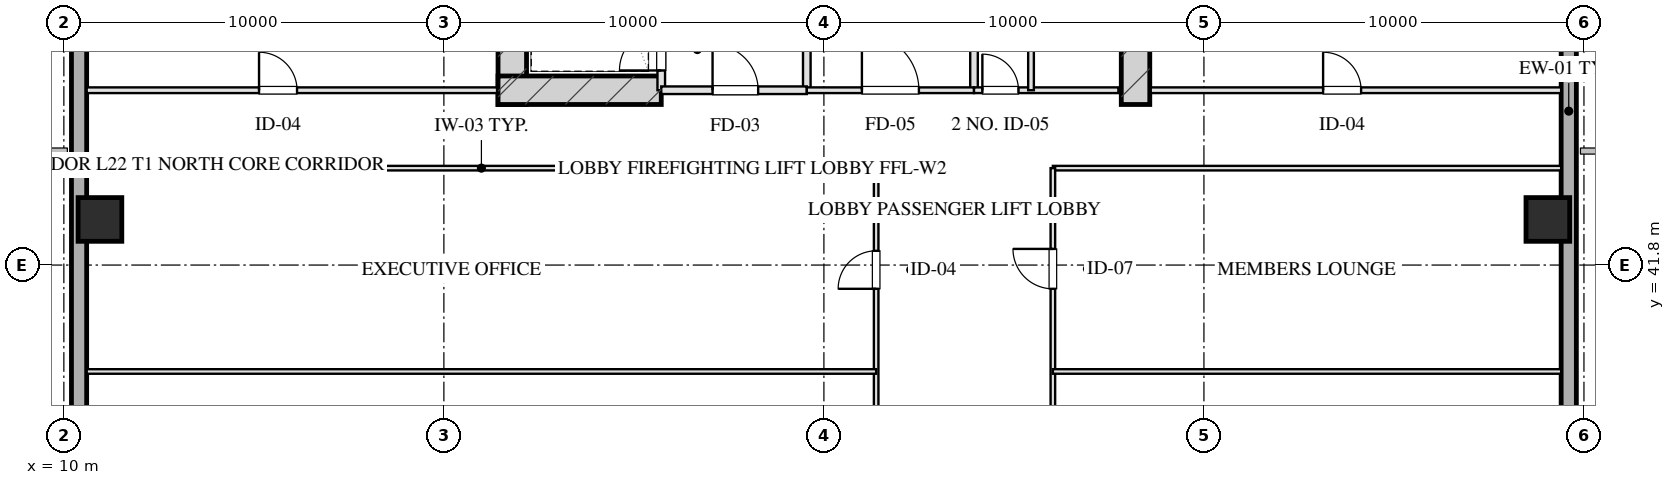
"""IFC4 building model, lengths in metres.
Left out: names, types, materials, properties, quantities, classifications, styles, units other than length and angle.
Written with IfcOpenShell. Run it as: python <this file> out.ifc"""

import sys

from ifc_helpers import new_model, si_unit, direction, frame, frame_2d, origin, origin_2d, place, context, subcontext, project, spatial, rectangle, hollow_rectangle, extrude, element, fill, save


model = new_model("IFC4")
c1 = context("Model", 3, precision=1e-05, world=origin(), true_north=direction((0.0, 1.0)))
c2 = subcontext(c1, "Body", "Model", "MODEL_VIEW")
j1 = project(units=[si_unit("LENGTHUNIT", "METRE"), si_unit("PLANEANGLEUNIT", "RADIAN")], contexts=[c1])
p1 = place(None, origin())
s1 = spatial("IfcSite", under=j1, at=p1, CompositionType="ELEMENT")
p2 = place(p1, origin())
s2 = spatial("IfcBuilding", under=s1, at=p2, CompositionType="ELEMENT")
p3 = place(p2, frame((0.0, 0.0, 88.55)))
s3 = spatial("IfcBuildingStorey", under=s2, at=p3, CompositionType="ELEMENT", Elevation=88.55)
for number, where, z_axis, x_axis in (
    (1, (21.8, 46.025, 0.0), (0.0, 0.0, 1.0), (0.0, 1.0, 0.0)),
    (2, (38.2, 46.025, 0.0), (0.0, 0.0, 1.0), (0.0, 1.0, 0.0)),
):
    element("IfcWall", number, at=place(p3, frame(where, z_axis=z_axis, x_axis=x_axis)), inside=s3, PredefinedType="SHEAR", context=c2, shape_type="SweptSolid", body=[
        extrude(rectangle(XDim=9.63, YDim=0.75, at=frame_2d((4.815, 0.0))), origin(), (0.0, 0.0, 1.0), 3.45),
    ])
p4 = place(p3, frame((21.425, 46.4, 0.0), z_axis=(0.0, 0.0, 1.0), x_axis=(1.0, 0.0, 0.0)))
e3 = element("IfcWall", 3, at=p4, inside=s3, PredefinedType="SHEAR", context=c2, shape_type="SweptSolid", body=[
    extrude(rectangle(XDim=4.295, YDim=0.75, at=frame_2d((2.147, 0.0))), origin(), (0.0, 0.0, 1.0), 3.45),
])
for number, where, z_axis, x_axis in (
    (4, (10.95, 43.0, 0.0), (0.0, 0.0, 1.0), (1.0, 0.0, 0.0)),
    (5, (49.05, 43.0, 0.0), (0.0, 0.0, 1.0), (1.0, 0.0, 0.0)),
):
    element("IfcColumn", number, at=place(p3, frame(where, z_axis=z_axis, x_axis=x_axis)), inside=s3, PredefinedType="COLUMN", context=c2, shape_type="SweptSolid", body=[
        extrude(hollow_rectangle(XDim=1.15, YDim=1.15, WallThickness=0.04, at=origin_2d()), origin(), (0.0, 0.0, 1.0), 3.451),
    ])
p5 = place(p3, frame((10.4, 7.2, 0.0), z_axis=(0.0, 0.0, 1.0), x_axis=(0.0, 1.0, 0.0)))
e6 = element("IfcWall", 6, at=p5, inside=s3, PredefinedType="SOLIDWALL", context=c2, shape_type="SweptSolid", body=[
    extrude(rectangle(XDim=53.6, YDim=0.4, at=frame_2d((26.8, 0.0))), origin(), (0.0, 0.0, 1.0), 2.55),
])
p6 = place(p5, frame((21.85, 0.0, 0.0)))
e7 = element("IfcOpeningElement", 7, at=p6, cuts=e6, PredefinedType="OPENING", context=c2, shape_type="SweptSolid", body=[
    extrude(rectangle(XDim=1.1, YDim=2.15, at=frame_2d((0.55, 1.075))), frame((0.0, 0.21, 0.0), z_axis=(0.0, -1.0, 0.0), x_axis=(1.0, 0.0, 0.0)), (0.0, 0.0, 1.0), 0.42),
])
p7 = place(p3, frame((49.6, 60.8, 0.0), z_axis=(0.0, 0.0, 1.0), x_axis=(0.0, -1.0, 0.0)))
e8 = element("IfcWall", 8, at=p7, inside=s3, PredefinedType="SOLIDWALL", context=c2, shape_type="SweptSolid", body=[
    extrude(rectangle(XDim=53.6, YDim=0.4, at=frame_2d((26.8, 0.0))), origin(), (0.0, 0.0, 1.0), 2.55),
])
p8 = place(p7, frame((23.0, 0.0, 0.75)))
e9 = element("IfcOpeningElement", 9, at=p8, cuts=e8, PredefinedType="OPENING", context=c2, shape_type="SweptSolid", body=[
    extrude(rectangle(XDim=2.4, YDim=1.4, at=frame_2d((1.2, 0.7))), frame((0.0, 0.21, 0.0), z_axis=(0.0, -1.0, 0.0), x_axis=(1.0, 0.0, 0.0)), (0.0, 0.0, 1.0), 0.42),
])
p9 = place(p7, frame((30.65, 0.0, 0.0)))
e10 = element("IfcOpeningElement", 10, at=p9, cuts=e8, PredefinedType="OPENING", context=c2, shape_type="SweptSolid", body=[
    extrude(rectangle(XDim=1.1, YDim=2.15, at=frame_2d((0.55, 1.075))), frame((0.0, 0.21, 0.0), z_axis=(0.0, -1.0, 0.0), x_axis=(1.0, 0.0, 0.0)), (0.0, 0.0, 1.0), 0.42),
])
p10 = place(p3, frame((25.72, 46.4, 0.0), z_axis=(0.0, 0.0, 1.0), x_axis=(0.0, 1.0, 0.0)))
e11 = element("IfcWall", 11, at=p10, inside=s3, PredefinedType="PARTITIONING", context=c2, shape_type="SweptSolid", body=[
    extrude(rectangle(XDim=1.9, YDim=0.2, at=frame_2d((0.95, 0.0))), origin(), (0.0, 0.0, 1.0), 3.155),
])
p11 = place(p10, frame((0.52, 0.0, 0.0)))
e12 = element("IfcOpeningElement", 12, at=p11, cuts=e11, PredefinedType="OPENING", context=c2, shape_type="SweptSolid", body=[
    extrude(rectangle(XDim=1.1, YDim=2.05, at=frame_2d((0.55, 1.025))), frame((0.0, 0.11, 0.0), z_axis=(0.0, -1.0, 0.0), x_axis=(1.0, 0.0, 0.0)), (0.0, 0.0, 1.0), 0.22),
])
p12 = place(p3, frame((29.55, 46.4, 0.0), z_axis=(0.0, 0.0, 1.0), x_axis=(0.0, 1.0, 0.0)))
e13 = element("IfcWall", 13, at=p12, inside=s3, PredefinedType="PARTITIONING", context=c2, shape_type="SweptSolid", body=[
    extrude(rectangle(XDim=8.43, YDim=0.2, at=frame_2d((4.215, 0.0))), origin(), (0.0, 0.0, 1.0), 3.155),
])
p13 = place(p3, frame((25.72, 46.4, 0.0), z_axis=(0.0, 0.0, 1.0), x_axis=(1.0, 0.0, 0.0)))
e14 = element("IfcWall", 14, at=p13, inside=s3, PredefinedType="PARTITIONING", context=c2, shape_type="SweptSolid", body=[
    extrude(rectangle(XDim=3.83, YDim=0.2, at=frame_2d((1.915, 0.0))), origin(), (0.0, 0.0, 1.0), 3.155),
])
p14 = place(p13, frame((1.35, 0.0, 0.0)))
e15 = element("IfcOpeningElement", 15, at=p14, cuts=e14, PredefinedType="OPENING", context=c2, shape_type="SweptSolid", body=[
    extrude(rectangle(XDim=1.2, YDim=2.05, at=frame_2d((0.6, 1.025))), frame((0.0, 0.11, 0.0), z_axis=(0.0, -1.0, 0.0), x_axis=(1.0, 0.0, 0.0)), (0.0, 0.0, 1.0), 0.22),
])
p15 = place(p3, frame((33.95, 46.4, 0.0), z_axis=(0.0, 0.0, 1.0), x_axis=(0.0, 1.0, 0.0)))
e16 = element("IfcWall", 16, at=p15, inside=s3, PredefinedType="PARTITIONING", context=c2, shape_type="SweptSolid", body=[
    extrude(rectangle(XDim=8.43, YDim=0.2, at=frame_2d((4.215, 0.0))), origin(), (0.0, 0.0, 1.0), 3.155),
])
p16 = place(p3, frame((29.55, 46.4, 0.0), z_axis=(0.0, 0.0, 1.0), x_axis=(1.0, 0.0, 0.0)))
e17 = element("IfcWall", 17, at=p16, inside=s3, PredefinedType="PARTITIONING", context=c2, shape_type="SweptSolid", body=[
    extrude(rectangle(XDim=4.4, YDim=0.15, at=frame_2d((2.2, 0.0))), origin(), (0.0, 0.0, 1.0), 3.155),
])
p17 = place(p16, frame((1.45, 0.0, 0.0)))
e18 = element("IfcOpeningElement", 18, at=p17, cuts=e17, PredefinedType="OPENING", context=c2, shape_type="SweptSolid", body=[
    extrude(rectangle(XDim=1.5, YDim=2.05, at=frame_2d((0.75, 1.025))), frame((0.0, 0.085, 0.0), z_axis=(0.0, -1.0, 0.0), x_axis=(1.0, 0.0, 0.0)), (0.0, 0.0, 1.0), 0.17),
])
p18 = place(p3, frame((33.95, 46.4, 0.0), z_axis=(0.0, 0.0, 1.0), x_axis=(1.0, 0.0, 0.0)))
e19 = element("IfcWall", 19, at=p18, inside=s3, PredefinedType="PARTITIONING", context=c2, shape_type="SweptSolid", body=[
    extrude(rectangle(XDim=3.8, YDim=0.15, at=frame_2d((1.9, 0.0))), origin(), (0.0, 0.0, 1.0), 3.155),
])
p19 = place(p18, frame((0.22, 0.0, 0.0)))
e20 = element("IfcOpeningElement", 20, at=p19, cuts=e19, PredefinedType="OPENING", context=c2, shape_type="SweptSolid", body=[
    extrude(rectangle(XDim=0.95, YDim=2.05, at=frame_2d((0.475, 1.025))), frame((0.0, 0.085, 0.0), z_axis=(0.0, -1.0, 0.0), x_axis=(1.0, 0.0, 0.0)), (0.0, 0.0, 1.0), 0.17),
])
p20 = place(p3, frame((35.45, 46.4, 0.0), z_axis=(0.0, 0.0, 1.0), x_axis=(0.0, 1.0, 0.0)))
e21 = element("IfcWall", 21, at=p20, inside=s3, PredefinedType="PARTITIONING", context=c2, shape_type="SweptSolid", body=[
    extrude(rectangle(XDim=8.43, YDim=0.15, at=frame_2d((4.215, 0.0))), origin(), (0.0, 0.0, 1.0), 2.745),
])
p21 = place(p20, frame((2.55, 0.0, 0.0)))
e22 = element("IfcOpeningElement", 22, at=p21, cuts=e21, PredefinedType="OPENING", context=c2, shape_type="SweptSolid", body=[
    extrude(rectangle(XDim=0.95, YDim=2.05, at=frame_2d((0.475, 1.025))), frame((0.0, 0.085, 0.0), z_axis=(0.0, -1.0, 0.0), x_axis=(1.0, 0.0, 0.0)), (0.0, 0.0, 1.0), 0.17),
])
p22 = place(p20, frame((4.7, 0.0, 0.0)))
e23 = element("IfcOpeningElement", 23, at=p22, cuts=e21, PredefinedType="OPENING", context=c2, shape_type="SweptSolid", body=[
    extrude(rectangle(XDim=0.9, YDim=2.05, at=frame_2d((0.45, 1.025))), frame((0.0, 0.085, 0.0), z_axis=(0.0, -1.0, 0.0), x_axis=(1.0, 0.0, 0.0)), (0.0, 0.0, 1.0), 0.17),
])
p23 = place(p20, frame((6.8, 0.0, 0.0)))
e24 = element("IfcOpeningElement", 24, at=p23, cuts=e21, PredefinedType="OPENING", context=c2, shape_type="SweptSolid", body=[
    extrude(rectangle(XDim=0.9, YDim=2.05, at=frame_2d((0.45, 1.025))), frame((0.0, 0.085, 0.0), z_axis=(0.0, -1.0, 0.0), x_axis=(1.0, 0.0, 0.0)), (0.0, 0.0, 1.0), 0.17),
])
p24 = place(p3, frame((10.6, 46.4, 0.0), z_axis=(0.0, 0.0, 1.0), x_axis=(1.0, 0.0, 0.0)))
e25 = element("IfcWall", 25, at=p24, inside=s3, PredefinedType="PARTITIONING", context=c2, shape_type="SweptSolid", body=[
    extrude(rectangle(XDim=10.8, YDim=0.15, at=frame_2d((5.4, 0.0))), origin(), (0.0, 0.0, 1.0), 2.15),
])
p25 = place(p24, frame((4.536, 0.0, 0.0)))
e26 = element("IfcOpeningElement", 26, at=p25, cuts=e25, PredefinedType="OPENING", context=c2, shape_type="SweptSolid", body=[
    extrude(rectangle(XDim=1.0, YDim=2.05, at=frame_2d((0.5, 1.025))), frame((0.0, 0.085, 0.0), z_axis=(0.0, -1.0, 0.0), x_axis=(1.0, 0.0, 0.0)), (0.0, 0.0, 1.0), 0.17),
])
p26 = place(p3, frame((38.6, 46.4, 0.0), z_axis=(0.0, 0.0, 1.0), x_axis=(1.0, 0.0, 0.0)))
e27 = element("IfcWall", 27, at=p26, inside=s3, PredefinedType="PARTITIONING", context=c2, shape_type="SweptSolid", body=[
    extrude(rectangle(XDim=10.8, YDim=0.15, at=frame_2d((5.4, 0.0))), origin(), (0.0, 0.0, 1.0), 2.15),
])
p27 = place(p26, frame((4.536, 0.0, 0.0)))
e28 = element("IfcOpeningElement", 28, at=p27, cuts=e27, PredefinedType="OPENING", context=c2, shape_type="SweptSolid", body=[
    extrude(rectangle(XDim=1.0, YDim=2.05, at=frame_2d((0.5, 1.025))), frame((0.0, 0.085, 0.0), z_axis=(0.0, -1.0, 0.0), x_axis=(1.0, 0.0, 0.0)), (0.0, 0.0, 1.0), 0.17),
])
p28 = place(p3, frame((10.6, 44.35, 0.0), z_axis=(0.0, 0.0, 1.0), x_axis=(1.0, 0.0, 0.0)))
e29 = element("IfcWall", 29, at=p28, inside=s3, PredefinedType="PARTITIONING", context=c2, shape_type="SweptSolid", body=[
    extrude(rectangle(XDim=20.775, YDim=0.12, at=frame_2d((10.387, 0.0))), origin(), (0.0, 0.0, 1.0), 2.15),
])
p29 = place(p3, frame((36.025, 44.35, 0.0), z_axis=(0.0, 0.0, 1.0), x_axis=(1.0, 0.0, 0.0)))
e30 = element("IfcWall", 30, at=p29, inside=s3, PredefinedType="PARTITIONING", context=c2, shape_type="SweptSolid", body=[
    extrude(rectangle(XDim=13.375, YDim=0.12, at=frame_2d((6.688, 0.0))), origin(), (0.0, 0.0, 1.0), 2.15),
])
p30 = place(p3, frame((31.375, 23.65, 0.0), z_axis=(0.0, 0.0, 1.0), x_axis=(0.0, 1.0, 0.0)))
e31 = element("IfcWall", 31, at=p30, inside=s3, PredefinedType="PARTITIONING", context=c2, shape_type="SweptSolid", body=[
    extrude(rectangle(XDim=20.7, YDim=0.12, at=frame_2d((10.35, 0.0))), origin(), (0.0, 0.0, 1.0), 3.155),
])
p31 = place(p30, frame((0.775, 0.0, 0.0)))
e32 = element("IfcOpeningElement", 32, at=p31, cuts=e31, PredefinedType="OPENING", context=c2, shape_type="SweptSolid", body=[
    extrude(rectangle(XDim=1.05, YDim=2.05, at=frame_2d((0.525, 1.025))), frame((0.0, 0.07, 0.0), z_axis=(0.0, -1.0, 0.0), x_axis=(1.0, 0.0, 0.0)), (0.0, 0.0, 1.0), 0.14),
])
p32 = place(p30, frame((5.35, 0.0, 0.0)))
e33 = element("IfcOpeningElement", 33, at=p32, cuts=e31, PredefinedType="OPENING", context=c2, shape_type="SweptSolid", body=[
    extrude(rectangle(XDim=1.0, YDim=2.05, at=frame_2d((0.5, 1.025))), frame((0.0, 0.07, 0.0), z_axis=(0.0, -1.0, 0.0), x_axis=(1.0, 0.0, 0.0)), (0.0, 0.0, 1.0), 0.14),
])
p33 = place(p30, frame((9.85, 0.0, 0.0)))
e34 = element("IfcOpeningElement", 34, at=p33, cuts=e31, PredefinedType="OPENING", context=c2, shape_type="SweptSolid", body=[
    extrude(rectangle(XDim=0.85, YDim=2.05, at=frame_2d((0.425, 1.025))), frame((0.0, 0.07, 0.0), z_axis=(0.0, -1.0, 0.0), x_axis=(1.0, 0.0, 0.0)), (0.0, 0.0, 1.0), 0.14),
])
p34 = place(p30, frame((12.95, 0.0, 0.0)))
e35 = element("IfcOpeningElement", 35, at=p34, cuts=e31, PredefinedType="OPENING", context=c2, shape_type="SweptSolid", body=[
    extrude(rectangle(XDim=1.0, YDim=2.05, at=frame_2d((0.5, 1.025))), frame((0.0, 0.07, 0.0), z_axis=(0.0, -1.0, 0.0), x_axis=(1.0, 0.0, 0.0)), (0.0, 0.0, 1.0), 0.14),
])
p35 = place(p30, frame((17.525, 0.0, 0.0)))
e36 = element("IfcOpeningElement", 36, at=p35, cuts=e31, PredefinedType="OPENING", context=c2, shape_type="SweptSolid", body=[
    extrude(rectangle(XDim=1.0, YDim=2.05, at=frame_2d((0.5, 1.025))), frame((0.0, 0.07, 0.0), z_axis=(0.0, -1.0, 0.0), x_axis=(1.0, 0.0, 0.0)), (0.0, 0.0, 1.0), 0.14),
])
p36 = place(p3, frame((36.025, 23.65, 0.0), z_axis=(0.0, 0.0, 1.0), x_axis=(0.0, 1.0, 0.0)))
e37 = element("IfcWall", 37, at=p36, inside=s3, PredefinedType="PARTITIONING", context=c2, shape_type="SweptSolid", body=[
    extrude(rectangle(XDim=20.7, YDim=0.12, at=frame_2d((10.35, 0.0))), origin(), (0.0, 0.0, 1.0), 3.155),
])
p37 = place(p36, frame((4.075, 0.0, 0.0)))
e38 = element("IfcOpeningElement", 38, at=p37, cuts=e37, PredefinedType="OPENING", context=c2, shape_type="SweptSolid", body=[
    extrude(rectangle(XDim=1.0, YDim=2.05, at=frame_2d((0.5, 1.025))), frame((0.0, 0.07, 0.0), z_axis=(0.0, -1.0, 0.0), x_axis=(1.0, 0.0, 0.0)), (0.0, 0.0, 1.0), 0.14),
])
p38 = place(p36, frame((11.75, 0.0, 0.0)))
e39 = element("IfcOpeningElement", 39, at=p38, cuts=e37, PredefinedType="OPENING", context=c2, shape_type="SweptSolid", body=[
    extrude(rectangle(XDim=1.0, YDim=2.05, at=frame_2d((0.5, 1.025))), frame((0.0, 0.07, 0.0), z_axis=(0.0, -1.0, 0.0), x_axis=(1.0, 0.0, 0.0)), (0.0, 0.0, 1.0), 0.14),
])
p39 = place(p36, frame((17.525, 0.0, 0.0)))
e40 = element("IfcOpeningElement", 40, at=p39, cuts=e37, PredefinedType="OPENING", context=c2, shape_type="SweptSolid", body=[
    extrude(rectangle(XDim=1.05, YDim=2.05, at=frame_2d((0.525, 1.025))), frame((0.0, 0.07, 0.0), z_axis=(0.0, -1.0, 0.0), x_axis=(1.0, 0.0, 0.0)), (0.0, 0.0, 1.0), 0.14),
])
p40 = place(p3, frame((10.6, 39.0, 0.0), z_axis=(0.0, 0.0, 1.0), x_axis=(1.0, 0.0, 0.0)))
e41 = element("IfcWall", 41, at=p40, inside=s3, PredefinedType="PARTITIONING", context=c2, shape_type="SweptSolid", body=[
    extrude(rectangle(XDim=20.775, YDim=0.12, at=frame_2d((10.387, 0.0))), origin(), (0.0, 0.0, 1.0), 3.155),
])
p41 = place(p3, frame((36.025, 39.0, 0.0), z_axis=(0.0, 0.0, 1.0), x_axis=(1.0, 0.0, 0.0)))
e42 = element("IfcWall", 42, at=p41, inside=s3, PredefinedType="PARTITIONING", context=c2, shape_type="SweptSolid", body=[
    extrude(rectangle(XDim=13.375, YDim=0.12, at=frame_2d((6.688, 0.0))), origin(), (0.0, 0.0, 1.0), 3.155),
])
p42 = place(p11, origin())
e43 = element("IfcDoor", 43, at=p42, inside=s3, OperationType="SINGLE_SWING_LEFT", PredefinedType="DOOR", context=c2, shape_type="SweptSolid", body=[
    extrude(rectangle(XDim=1.1, YDim=2.05, at=frame_2d((0.55, 1.025))), frame((0.0, 0.025, 0.0), z_axis=(0.0, -1.0, 0.0), x_axis=(1.0, 0.0, 0.0)), (0.0, 0.0, 1.0), 0.05),
])
fill(e12, e43)
p43 = place(p14, origin())
e44 = element("IfcDoor", 44, at=p43, inside=s3, OperationType="SINGLE_SWING_LEFT", PredefinedType="DOOR", context=c2, shape_type="SweptSolid", body=[
    extrude(rectangle(XDim=1.2, YDim=2.05, at=frame_2d((0.6, 1.025))), frame((0.0, 0.025, 0.0), z_axis=(0.0, -1.0, 0.0), x_axis=(1.0, 0.0, 0.0)), (0.0, 0.0, 1.0), 0.05),
])
fill(e15, e44)
p44 = place(p17, origin())
e45 = element("IfcDoor", 45, at=p44, inside=s3, OperationType="SINGLE_SWING_LEFT", PredefinedType="DOOR", context=c2, shape_type="SweptSolid", body=[
    extrude(rectangle(XDim=1.5, YDim=2.05, at=frame_2d((0.75, 1.025))), frame((0.0, 0.025, 0.0), z_axis=(0.0, -1.0, 0.0), x_axis=(1.0, 0.0, 0.0)), (0.0, 0.0, 1.0), 0.05),
])
fill(e18, e45)
p45 = place(p19, origin())
e46 = element("IfcDoor", 46, at=p45, inside=s3, OperationType="SINGLE_SWING_LEFT", PredefinedType="DOOR", context=c2, shape_type="SweptSolid", body=[
    extrude(rectangle(XDim=0.95, YDim=2.05, at=frame_2d((0.475, 1.025))), frame((0.0, 0.025, 0.0), z_axis=(0.0, -1.0, 0.0), x_axis=(1.0, 0.0, 0.0)), (0.0, 0.0, 1.0), 0.05),
])
fill(e20, e46)
p46 = place(p25, origin())
e47 = element("IfcDoor", 47, at=p46, inside=s3, OperationType="SINGLE_SWING_LEFT", PredefinedType="DOOR", context=c2, shape_type="SweptSolid", body=[
    extrude(rectangle(XDim=1.0, YDim=2.05, at=frame_2d((0.5, 1.025))), frame((0.0, 0.025, 0.0), z_axis=(0.0, -1.0, 0.0), x_axis=(1.0, 0.0, 0.0)), (0.0, 0.0, 1.0), 0.05),
])
fill(e26, e47)
p47 = place(p27, origin())
e48 = element("IfcDoor", 48, at=p47, inside=s3, OperationType="SINGLE_SWING_LEFT", PredefinedType="DOOR", context=c2, shape_type="SweptSolid", body=[
    extrude(rectangle(XDim=1.0, YDim=2.05, at=frame_2d((0.5, 1.025))), frame((0.0, 0.025, 0.0), z_axis=(0.0, -1.0, 0.0), x_axis=(1.0, 0.0, 0.0)), (0.0, 0.0, 1.0), 0.05),
])
fill(e28, e48)
p48 = place(p35, origin())
e49 = element("IfcDoor", 49, at=p48, inside=s3, OperationType="SINGLE_SWING_LEFT", PredefinedType="DOOR", context=c2, shape_type="SweptSolid", body=[
    extrude(rectangle(XDim=1.0, YDim=2.05, at=frame_2d((0.5, 1.025))), frame((0.0, 0.025, 0.0), z_axis=(0.0, -1.0, 0.0), x_axis=(1.0, 0.0, 0.0)), (0.0, 0.0, 1.0), 0.05),
])
fill(e36, e49)
p49 = place(p39, origin())
e50 = element("IfcDoor", 50, at=p49, inside=s3, OperationType="SINGLE_SWING_RIGHT", PredefinedType="DOOR", context=c2, shape_type="SweptSolid", body=[
    extrude(rectangle(XDim=1.05, YDim=2.05, at=frame_2d((0.525, 1.025))), frame((0.0, 0.025, 0.0), z_axis=(0.0, -1.0, 0.0), x_axis=(1.0, 0.0, 0.0)), (0.0, 0.0, 1.0), 0.05),
])
fill(e40, e50)
save(model, sys.argv[1])
